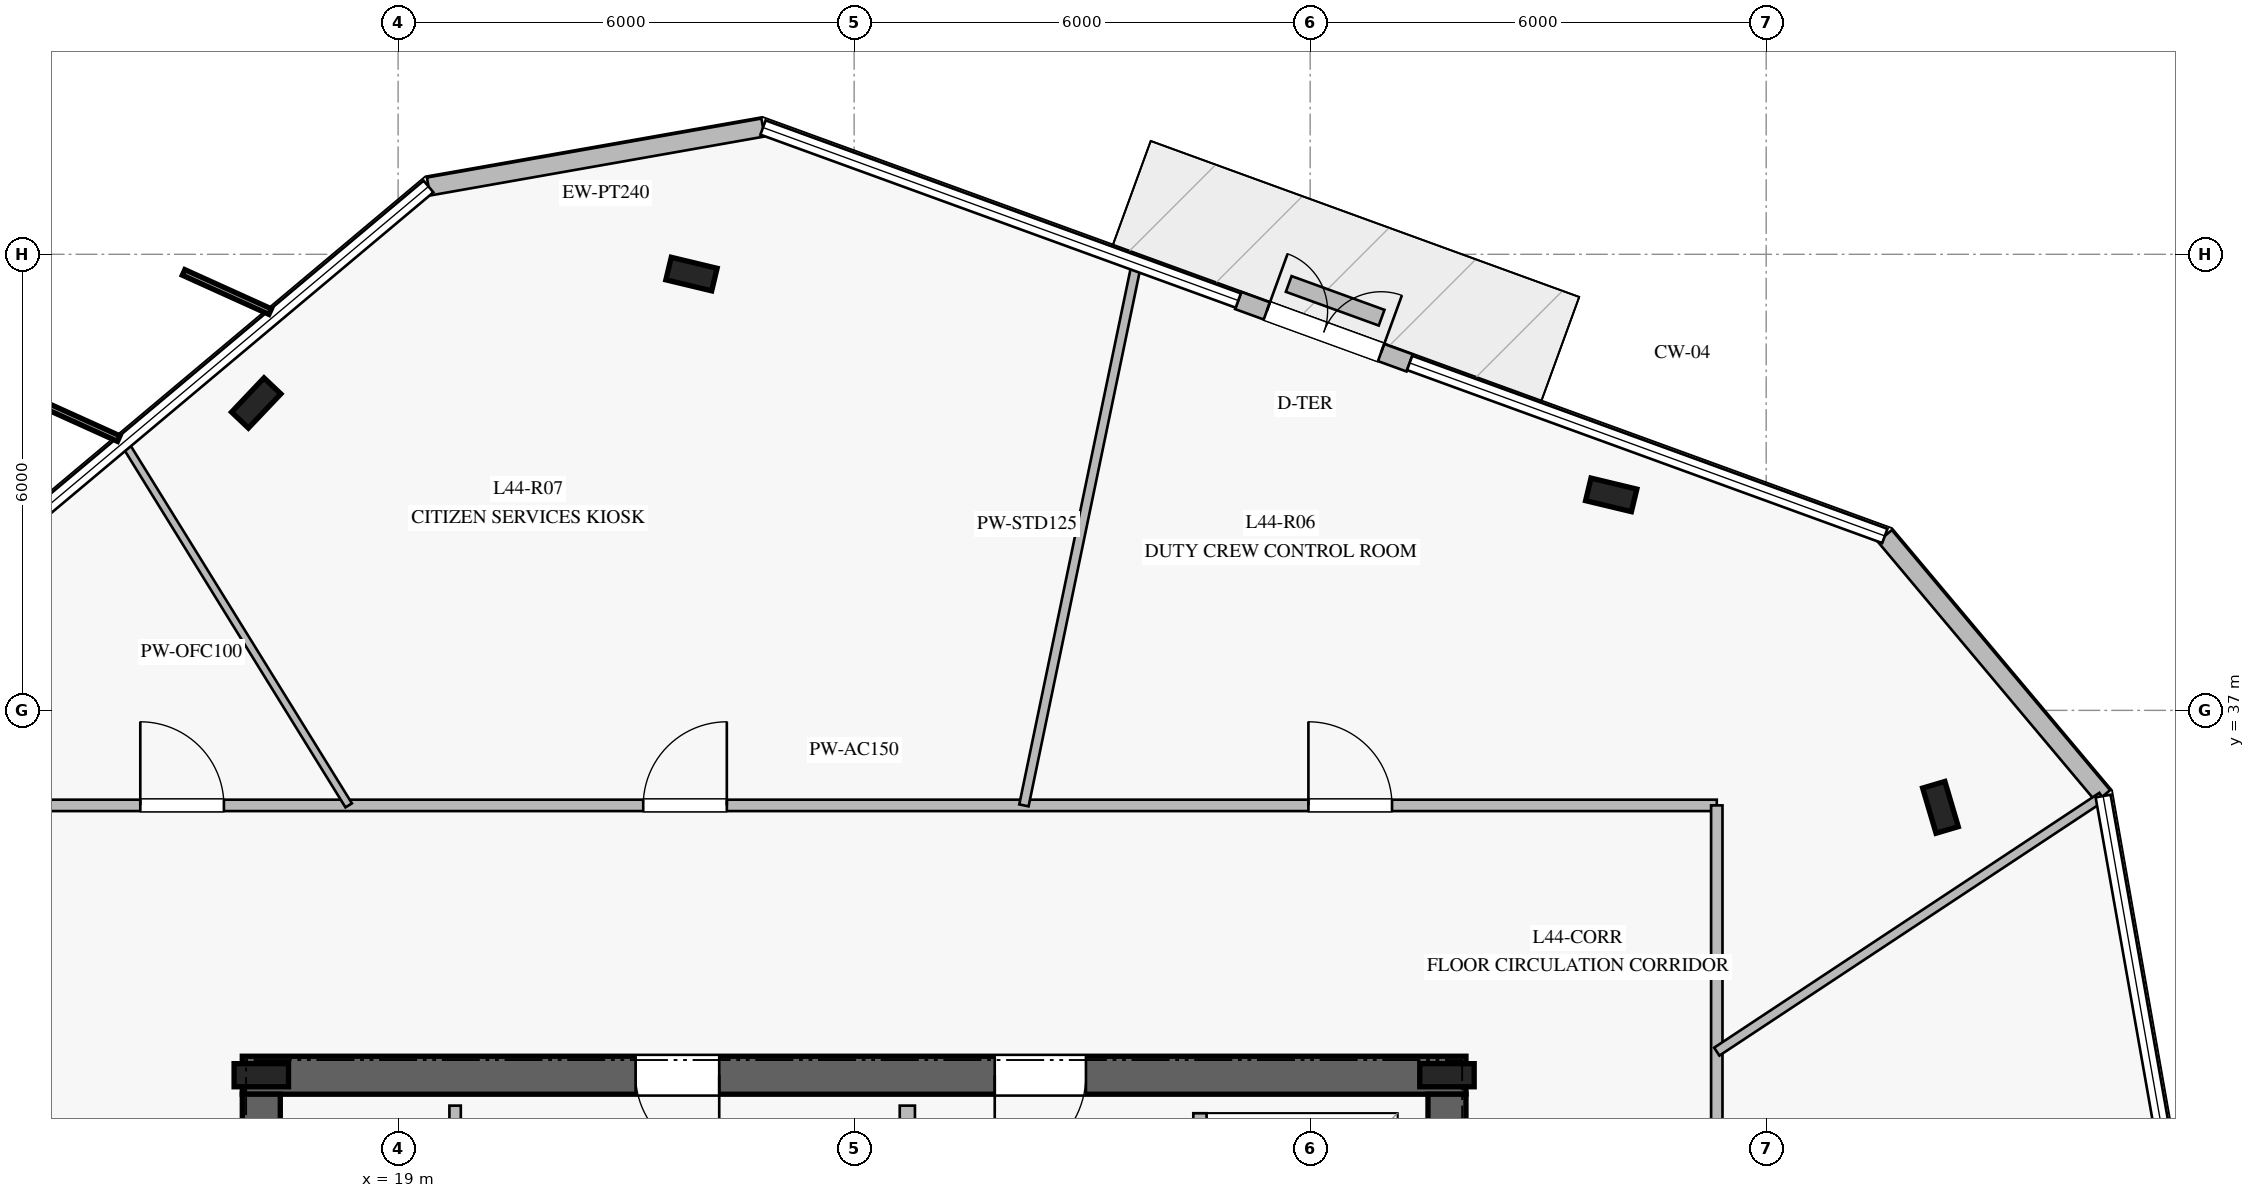
"""IFC4 building model, lengths in metres.
Left out: names, types, materials, properties, quantities, classifications, styles, units other than length and angle.
Written with IfcOpenShell. Run it as: python <this file> out.ifc"""

import sys

from ifc_helpers import new_model, si_unit, direction, frame, frame_2d, origin, origin_2d, place, context, subcontext, project, spatial, rectangle, i_section, extrude, element, fill, save


model = new_model("IFC4")
c1 = context("Model", 3, precision=1e-05, world=origin(), true_north=direction((0.0, 1.0)))
c2 = subcontext(c1, "Body", "Model", "MODEL_VIEW")
j1 = project(units=[si_unit("LENGTHUNIT", "METRE"), si_unit("PLANEANGLEUNIT", "RADIAN")], contexts=[c1])
p1 = place(None, origin())
s1 = spatial("IfcSite", under=j1, at=p1, CompositionType="ELEMENT")
p2 = place(p1, origin())
s2 = spatial("IfcBuilding", under=s1, at=p2, CompositionType="ELEMENT")
p3 = place(p2, frame((0.0, 0.0, 184.8)))
s3 = spatial("IfcBuildingStorey", under=s2, at=p3, CompositionType="ELEMENT", Elevation=184.8)
p4 = place(p3, frame((33.05, 32.2, 0.0), z_axis=(0.0, 0.0, 1.0), x_axis=(-1.0, 0.0, 0.0)))
e1 = element("IfcWall", 1, at=p4, inside=s3, PredefinedType="SHEAR", context=c2, shape_type="SweptSolid", body=[
    extrude(rectangle(XDim=16.1, YDim=0.5, at=frame_2d((8.05, 0.0))), origin(), (0.0, 0.0, 1.0), 3.78),
])
p5 = place(p4, frame((5.0, 0.0, 0.0)))
e2 = element("IfcOpeningElement", 2, at=p5, cuts=e1, PredefinedType="OPENING", context=c2, shape_type="SweptSolid", body=[
    extrude(rectangle(XDim=1.2, YDim=2.25, at=frame_2d((0.6, 1.125))), frame((0.0, 0.26, 0.0), z_axis=(0.0, -1.0, 0.0), x_axis=(1.0, 0.0, 0.0)), (0.0, 0.0, 1.0), 0.52),
])
p6 = place(p4, frame((9.825, 0.0, 0.0)))
e3 = element("IfcOpeningElement", 3, at=p6, cuts=e1, PredefinedType="OPENING", context=c2, shape_type="SweptSolid", body=[
    extrude(rectangle(XDim=1.1, YDim=2.2, at=frame_2d((0.55, 1.1))), frame((0.0, 0.26, 0.0), z_axis=(0.0, -1.0, 0.0), x_axis=(1.0, 0.0, 0.0)), (0.0, 0.0, 1.0), 0.52),
])
p7 = place(p3, frame((17.2, 31.95, 0.0), z_axis=(0.0, 0.0, 1.0), x_axis=(0.0, -1.0, 0.0)))
e4 = element("IfcWall", 4, at=p7, inside=s3, PredefinedType="SHEAR", context=c2, shape_type="SweptSolid", body=[
    extrude(rectangle(XDim=13.9, YDim=0.5, at=frame_2d((6.95, 0.0))), origin(), (0.0, 0.0, 1.0), 3.78),
])
p8 = place(p7, frame((2.1, 0.0, 0.0)))
e5 = element("IfcOpeningElement", 5, at=p8, cuts=e4, PredefinedType="OPENING", context=c2, shape_type="SweptSolid", body=[
    extrude(rectangle(XDim=1.5, YDim=2.2, at=frame_2d((0.75, 1.1))), frame((0.0, 0.26, 0.0), z_axis=(0.0, -1.0, 0.0), x_axis=(1.0, 0.0, 0.0)), (0.0, 0.0, 1.0), 0.52),
])
p9 = place(p3, frame((32.8, 18.05, 0.0), z_axis=(0.0, 0.0, 1.0), x_axis=(0.0, 1.0, 0.0)))
e6 = element("IfcWall", 6, at=p9, inside=s3, PredefinedType="SHEAR", context=c2, shape_type="SweptSolid", body=[
    extrude(rectangle(XDim=13.9, YDim=0.5, at=frame_2d((6.95, 0.0))), origin(), (0.0, 0.0, 1.0), 3.78),
])
for number, where, z_axis, x_axis in (
    (7, (32.8, 32.2, 0.0), (0.0, 0.0, 1.0), (1.0, 0.0, 0.0)),
    (8, (17.2, 32.2, 0.0), (0.0, 0.0, 1.0), (1.0, 0.0, 0.0)),
):
    element("IfcColumn", number, at=place(p3, frame(where, z_axis=z_axis, x_axis=x_axis)), inside=s3, PredefinedType="COLUMN", context=c2, shape_type="SweptSolid", body=[
        extrude(i_section(OverallWidth=0.304, OverallDepth=0.716, WebThickness=0.021, FlangeThickness=0.04, at=origin_2d()), origin(), (0.0, 0.0, 1.0), 4.0),
    ])
for number, where, z_axis, x_axis in (
    (9, (34.961, 39.835, 0.0), (0.0, 0.0, 1.0), (-0.972, 0.233, 0.0)),
    (10, (22.86, 42.74, 0.0), (0.0, 0.0, 1.0), (-0.972, 0.233, 0.0)),
    (11, (17.133, 41.044, 0.0), (0.0, 0.0, 1.0), (0.688, 0.725, 0.0)),
    (12, (39.293, 35.724, 0.0), (0.0, 0.0, 1.0), (-0.284, 0.959, 0.0)),
):
    element("IfcColumn", number, at=place(p3, frame(where, z_axis=z_axis, x_axis=x_axis)), inside=s3, PredefinedType="COLUMN", context=c2, shape_type="SweptSolid", body=[
        extrude(i_section(OverallWidth=0.305, OverallDepth=0.62, WebThickness=0.021, FlangeThickness=0.04, at=origin_2d()), origin(), (0.0, 0.0, 1.0), 4.0),
    ])
p10 = place(p3, frame((32.309, 41.571, 0.0), z_axis=(0.0, 0.0, 1.0), x_axis=(-0.939659694648, 0.342110593602, 0.0)))
e13 = element("IfcWall", 13, at=p10, inside=s3, PredefinedType="STANDARD", context=c2, shape_type="SweptSolid", body=[
    extrude(rectangle(XDim=2.4, YDim=0.24, at=frame_2d((1.2, 0.0))), origin(), (0.0, 0.0, 1.0), 3.78),
])
p11 = place(p10, frame((0.4, 0.0, 0.0)))
e14 = element("IfcOpeningElement", 14, at=p11, cuts=e13, PredefinedType="OPENING", context=c2, shape_type="SweptSolid", body=[
    extrude(rectangle(XDim=1.6, YDim=2.25, at=frame_2d((0.8, 1.125))), frame((0.0, 0.13, 0.0), z_axis=(0.0, -1.0, 0.0), x_axis=(1.0, 0.0, 0.0)), (0.0, 0.0, 1.0), 0.26),
])
p12 = place(p3, frame((23.801, 44.668, 0.0), z_axis=(0.0, 0.0, 1.0), x_axis=(-0.984813792018, -0.173613925281, 0.0)))
e15 = element("IfcWall", 15, at=p12, inside=s3, PredefinedType="STANDARD", context=c2, shape_type="SweptSolid", body=[
    extrude(rectangle(XDim=4.469, YDim=0.24, at=frame_2d((2.234, 0.0))), origin(), (0.0, 0.0, 1.0), 3.78),
])
p13 = place(p3, frame((41.433, 35.873, 0.0), z_axis=(0.0, 0.0, 1.0), x_axis=(-0.642889570515, 0.765958876261, 0.0)))
e16 = element("IfcWall", 16, at=p13, inside=s3, PredefinedType="STANDARD", context=c2, shape_type="SweptSolid", body=[
    extrude(rectangle(XDim=4.468, YDim=0.24, at=frame_2d((2.234, 0.0))), origin(), (0.0, 0.0, 1.0), 3.78),
])
p14 = place(p3, frame((31.94, 42.166, 0.0), z_axis=(0.0, 0.0, 1.0), x_axis=(-0.93985371871, 0.341577205661, 0.0)))
e17 = element("IfcWall", 17, at=p14, inside=s3, PredefinedType="USERDEFINED", context=c2, shape_type="SweptSolid", body=[
    extrude(rectangle(XDim=1.3, YDim=0.22, at=frame_2d((0.65, 0.0))), origin(), (0.0, 0.0, 1.0), 0.4),
])
p15 = place(p3, frame((25.7, 26.65, 0.0), z_axis=(0.0, 0.0, 1.0), x_axis=(0.0, 1.0, 0.0)))
e18 = element("IfcWall", 18, at=p15, inside=s3, PredefinedType="PARTITIONING", context=c2, shape_type="SweptSolid", body=[
    extrude(rectangle(XDim=5.15, YDim=0.2, at=frame_2d((2.575, 0.0))), origin(), (0.0, 0.0, 1.0), 3.78),
])
p16 = place(p3, frame((19.75, 29.39, 0.0), z_axis=(0.0, 0.0, 1.0), x_axis=(0.0, 1.0, 0.0)))
e19 = element("IfcWall", 19, at=p16, inside=s3, PredefinedType="PARTITIONING", context=c2, shape_type="SweptSolid", body=[
    extrude(rectangle(XDim=2.41, YDim=0.15, at=frame_2d((1.205, 0.0))), origin(), (0.0, 0.0, 1.0), 3.78),
])
p17 = place(p3, frame((29.55, 29.1, 0.0), z_axis=(0.0, 0.0, 1.0), x_axis=(0.0, 1.0, 0.0)))
e20 = element("IfcWall", 20, at=p17, inside=s3, PredefinedType="PARTITIONING", context=c2, shape_type="SweptSolid", body=[
    extrude(rectangle(XDim=2.6, YDim=0.175, at=frame_2d((1.3, 0.0))), origin(), (0.0, 0.0, 1.0), 3.78),
])
p18 = place(p17, frame((0.7, 0.0, 0.0)))
e21 = element("IfcOpeningElement", 21, at=p18, cuts=e20, PredefinedType="OPENING", context=c2, shape_type="SweptSolid", body=[
    extrude(rectangle(XDim=1.2, YDim=2.2, at=frame_2d((0.6, 1.1))), frame((0.0, 0.098, 0.0), z_axis=(0.0, -1.0, 0.0), x_axis=(1.0, 0.0, 0.0)), (0.0, 0.0, 1.0), 0.195),
])
p19 = place(p3, frame((13.65, 35.75, 0.0), z_axis=(0.0, 0.0, 1.0), x_axis=(1.0, 0.0, 0.0)))
e22 = element("IfcWall", 22, at=p19, inside=s3, PredefinedType="PARTITIONING", context=c2, shape_type="SweptSolid", body=[
    extrude(rectangle(XDim=22.7, YDim=0.15, at=frame_2d((11.35, 0.0))), origin(), (0.0, 0.0, 1.0), 3.05),
])
p20 = place(p19, frame((17.327, 0.0, 0.0)))
e23 = element("IfcOpeningElement", 23, at=p20, cuts=e22, PredefinedType="OPENING", context=c2, shape_type="SweptSolid", body=[
    extrude(rectangle(XDim=1.1, YDim=2.2, at=frame_2d((0.55, 1.1))), frame((0.0, 0.085, 0.0), z_axis=(0.0, -1.0, 0.0), x_axis=(1.0, 0.0, 0.0)), (0.0, 0.0, 1.0), 0.17),
])
p21 = place(p19, frame((8.575, 0.0, 0.0)))
e24 = element("IfcOpeningElement", 24, at=p21, cuts=e22, PredefinedType="OPENING", context=c2, shape_type="SweptSolid", body=[
    extrude(rectangle(XDim=1.1, YDim=2.2, at=frame_2d((0.55, 1.1))), frame((0.0, 0.085, 0.0), z_axis=(0.0, -1.0, 0.0), x_axis=(1.0, 0.0, 0.0)), (0.0, 0.0, 1.0), 0.17),
])
p22 = place(p19, frame((1.958, 0.0, 0.0)))
e25 = element("IfcOpeningElement", 25, at=p22, cuts=e22, PredefinedType="OPENING", context=c2, shape_type="SweptSolid", body=[
    extrude(rectangle(XDim=1.1, YDim=2.2, at=frame_2d((0.55, 1.1))), frame((0.0, 0.085, 0.0), z_axis=(0.0, -1.0, 0.0), x_axis=(1.0, 0.0, 0.0)), (0.0, 0.0, 1.0), 0.17),
])
p23 = place(p3, frame((36.35, 35.75, 0.0), z_axis=(0.0, 0.0, 1.0), x_axis=(0.0, -1.0, 0.0)))
e26 = element("IfcWall", 26, at=p23, inside=s3, PredefinedType="PARTITIONING", context=c2, shape_type="SweptSolid", body=[
    extrude(rectangle(XDim=21.5, YDim=0.15, at=frame_2d((10.75, 0.0))), origin(), (0.0, 0.0, 1.0), 3.05),
])
p24 = place(p23, frame((16.672, 0.0, 0.0)))
e27 = element("IfcOpeningElement", 27, at=p24, cuts=e26, PredefinedType="OPENING", context=c2, shape_type="SweptSolid", body=[
    extrude(rectangle(XDim=1.1, YDim=2.2, at=frame_2d((0.55, 1.1))), frame((0.0, 0.085, 0.0), z_axis=(0.0, -1.0, 0.0), x_axis=(1.0, 0.0, 0.0)), (0.0, 0.0, 1.0), 0.17),
])
p25 = place(p23, frame((7.788, 0.0, 0.0)))
e28 = element("IfcOpeningElement", 28, at=p25, cuts=e26, PredefinedType="OPENING", context=c2, shape_type="SweptSolid", body=[
    extrude(rectangle(XDim=1.1, YDim=2.2, at=frame_2d((0.55, 1.1))), frame((0.0, 0.085, 0.0), z_axis=(0.0, -1.0, 0.0), x_axis=(1.0, 0.0, 0.0)), (0.0, 0.0, 1.0), 0.17),
])
p26 = place(p3, frame((27.234, 35.75, 0.0), z_axis=(0.0, 0.0, 1.0), x_axis=(0.203445620086, 0.979086247308, 0.0)))
e29 = element("IfcWall", 29, at=p26, inside=s3, PredefinedType="PARTITIONING", context=c2, shape_type="SweptSolid", body=[
    extrude(rectangle(XDim=7.265, YDim=0.125, at=frame_2d((3.632, 0.0))), origin(), (0.0, 0.0, 1.0), 3.18),
])
p27 = place(p3, frame((18.35, 35.75, 0.0), z_axis=(0.0, 0.0, 1.0), x_axis=(-0.526135592747, 0.850400692641, 0.0)))
e30 = element("IfcWall", 30, at=p27, inside=s3, PredefinedType="MOVABLE", context=c2, shape_type="SweptSolid", body=[
    extrude(rectangle(XDim=5.603, YDim=0.1, at=frame_2d((2.802, 0.0))), origin(), (0.0, 0.0, 1.0), 3.18),
])
p28 = place(p3, frame((36.35, 32.51, 0.0), z_axis=(0.0, 0.0, 1.0), x_axis=(0.833986040468, 0.551785541949, 0.0)))
e31 = element("IfcWall", 31, at=p28, inside=s3, PredefinedType="PARTITIONING", context=c2, shape_type="SweptSolid", body=[
    extrude(rectangle(XDim=6.077, YDim=0.125, at=frame_2d((3.038, 0.0))), origin(), (0.0, 0.0, 1.0), 3.18),
])
p29 = place(p11, frame((1.6, 0.0, 0.0), z_axis=(0.0, 0.0, 1.0), x_axis=(-1.0, 0.0, 0.0)))
e32 = element("IfcDoor", 32, at=p29, inside=s3, OperationType="DOUBLE_DOOR_SINGLE_SWING", PredefinedType="DOOR", context=c2, shape_type="SweptSolid", body=[
    extrude(rectangle(XDim=1.6, YDim=2.25, at=frame_2d((0.8, 1.125))), frame((0.0, 0.025, 0.0), z_axis=(0.0, -1.0, 0.0), x_axis=(1.0, 0.0, 0.0)), (0.0, 0.0, 1.0), 0.05),
])
fill(e14, e32)
p30 = place(p5, origin())
e33 = element("IfcDoor", 33, at=p30, inside=s3, OperationType="SINGLE_SWING_RIGHT", PredefinedType="DOOR", context=c2, shape_type="SweptSolid", body=[
    extrude(rectangle(XDim=1.2, YDim=2.25, at=frame_2d((0.6, 1.125))), frame((0.0, 0.025, 0.0), z_axis=(0.0, -1.0, 0.0), x_axis=(1.0, 0.0, 0.0)), (0.0, 0.0, 1.0), 0.05),
])
fill(e2, e33)
p31 = place(p6, origin())
e34 = element("IfcDoor", 34, at=p31, inside=s3, OperationType="SINGLE_SWING_LEFT", PredefinedType="DOOR", context=c2, shape_type="SweptSolid", body=[
    extrude(rectangle(XDim=1.1, YDim=2.2, at=frame_2d((0.55, 1.1))), frame((0.0, 0.025, 0.0), z_axis=(0.0, -1.0, 0.0), x_axis=(1.0, 0.0, 0.0)), (0.0, 0.0, 1.0), 0.05),
])
fill(e3, e34)
p32 = place(p20, origin())
e35 = element("IfcDoor", 35, at=p32, inside=s3, OperationType="SINGLE_SWING_LEFT", PredefinedType="DOOR", context=c2, shape_type="SweptSolid", body=[
    extrude(rectangle(XDim=1.1, YDim=2.2, at=frame_2d((0.55, 1.1))), frame((0.0, 0.025, 0.0), z_axis=(0.0, -1.0, 0.0), x_axis=(1.0, 0.0, 0.0)), (0.0, 0.0, 1.0), 0.05),
])
fill(e23, e35)
p33 = place(p21, origin())
e36 = element("IfcDoor", 36, at=p33, inside=s3, OperationType="SINGLE_SWING_RIGHT", PredefinedType="DOOR", context=c2, shape_type="SweptSolid", body=[
    extrude(rectangle(XDim=1.1, YDim=2.2, at=frame_2d((0.55, 1.1))), frame((0.0, 0.025, 0.0), z_axis=(0.0, -1.0, 0.0), x_axis=(1.0, 0.0, 0.0)), (0.0, 0.0, 1.0), 0.05),
])
fill(e24, e36)
p34 = place(p22, origin())
e37 = element("IfcDoor", 37, at=p34, inside=s3, OperationType="SINGLE_SWING_LEFT", PredefinedType="DOOR", context=c2, shape_type="SweptSolid", body=[
    extrude(rectangle(XDim=1.1, YDim=2.2, at=frame_2d((0.55, 1.1))), frame((0.0, 0.025, 0.0), z_axis=(0.0, -1.0, 0.0), x_axis=(1.0, 0.0, 0.0)), (0.0, 0.0, 1.0), 0.05),
])
fill(e25, e37)
save(model, sys.argv[1])
